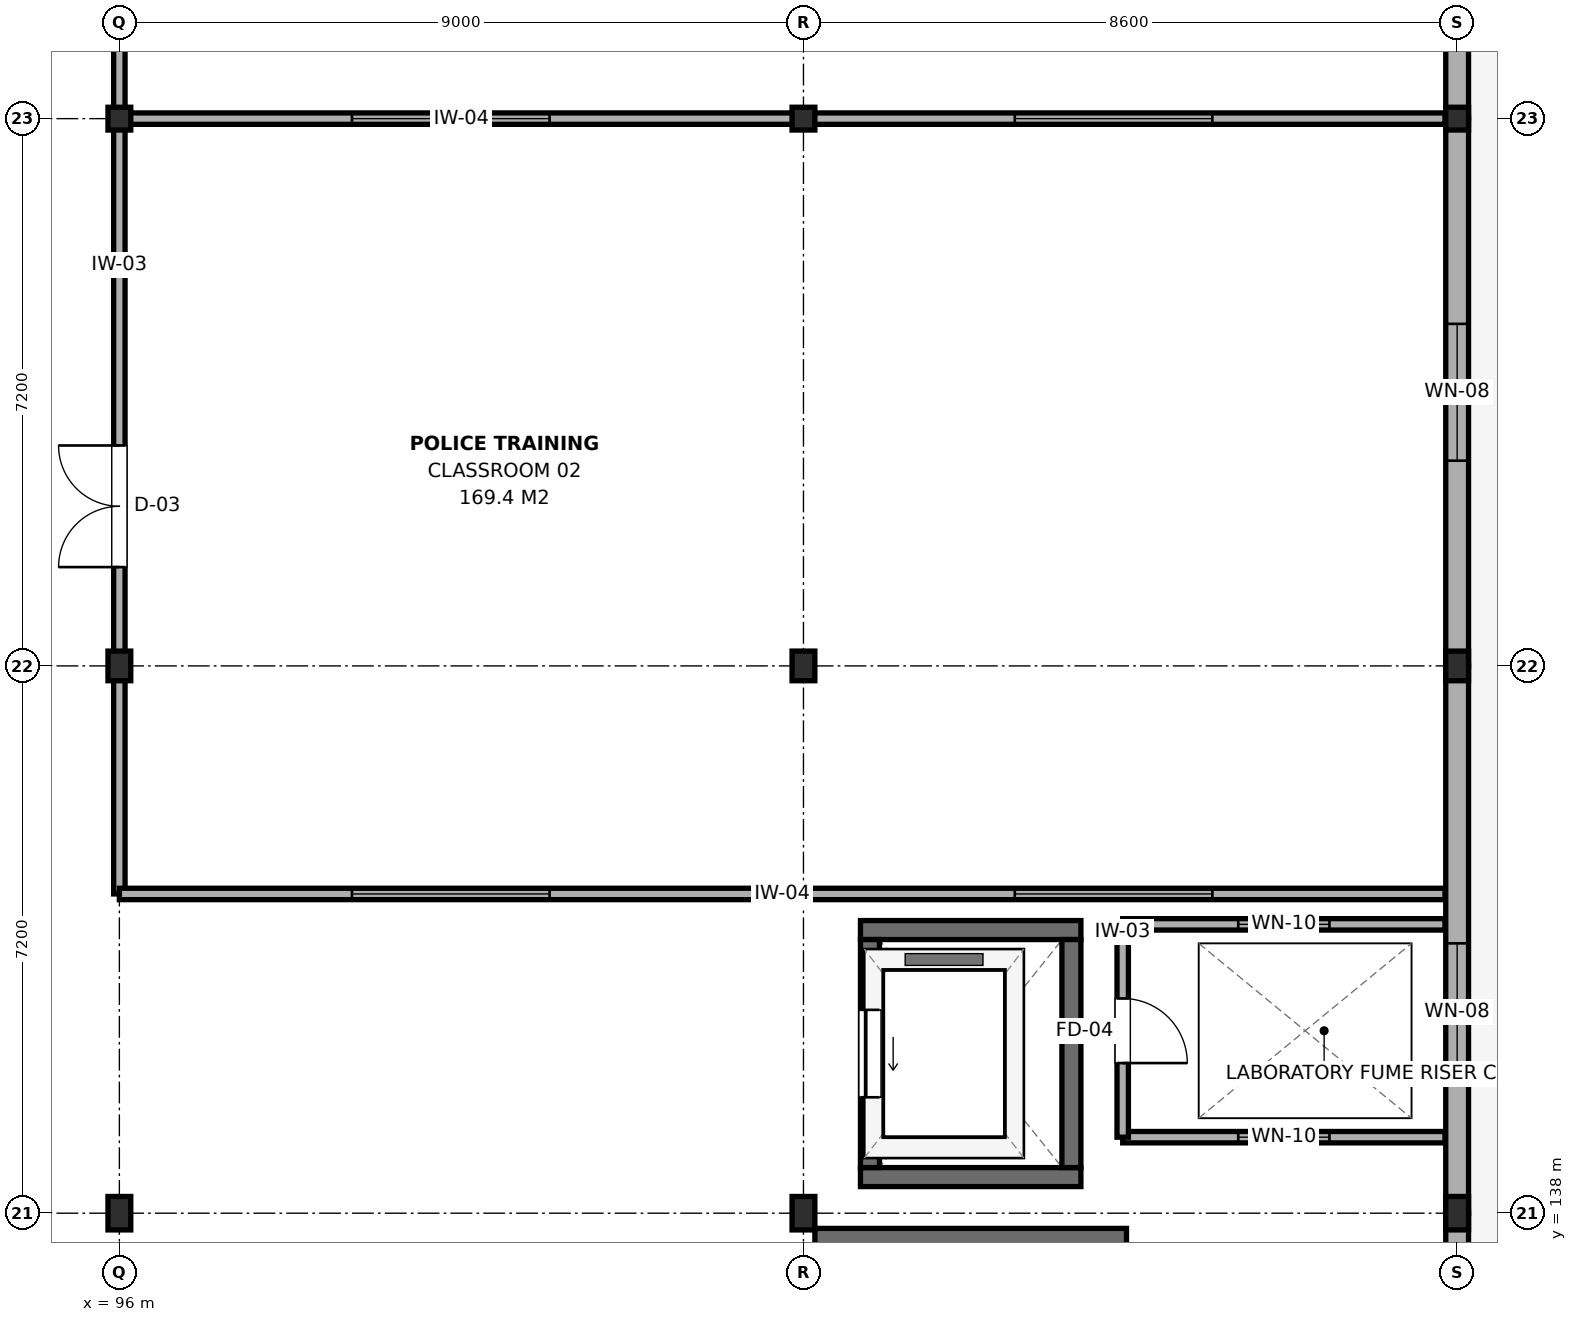
"""IFC4 building model, lengths in metres.
Left out: names, types, materials, properties, quantities, classifications, styles, units other than length and angle.
Written with IfcOpenShell. Run it as: python <this file> out.ifc"""

import sys

from ifc_helpers import new_model, si_unit, direction, frame, frame_2d, origin, origin_2d, place, context, subcontext, project, spatial, rectangle, i_section, extrude, element, fill, save


model = new_model("IFC4")
c1 = context("Model", 3, precision=1e-05, world=origin(), true_north=direction((0.0, 1.0)))
c2 = subcontext(c1, "Body", "Model", "MODEL_VIEW")
j1 = project(units=[si_unit("LENGTHUNIT", "METRE"), si_unit("PLANEANGLEUNIT", "RADIAN")], contexts=[c1])
p1 = place(None, origin())
s1 = spatial("IfcSite", under=j1, at=p1, CompositionType="ELEMENT")
p2 = place(p1, origin())
s2 = spatial("IfcBuilding", under=s1, at=p2, CompositionType="ELEMENT")
p3 = place(p2, frame((0.0, 0.0, 13.2)))
s3 = spatial("IfcBuildingStorey", under=s2, at=p3, CompositionType="ELEMENT", Elevation=13.2)
p4 = place(p3, frame((96.0, 138.0, 0.0), z_axis=(0.0, 0.0, 1.0), x_axis=(1.0, 0.0, 0.0)))
e1 = element("IfcColumn", 1, at=p4, inside=s3, PredefinedType="COLUMN", context=c2, shape_type="SweptSolid", body=[
    extrude(i_section(OverallWidth=0.3, OverallDepth=0.44, WebThickness=0.011, FlangeThickness=0.021, FilletRadius=0.027, at=origin_2d()), origin(), (0.0, 0.0, 1.0), 3.9),
])
p5 = place(p3, frame((96.0, 145.2, 0.0), z_axis=(0.0, 0.0, 1.0), x_axis=(1.0, 0.0, 0.0)))
e2 = element("IfcColumn", 2, at=p5, inside=s3, PredefinedType="COLUMN", context=c2, shape_type="SweptSolid", body=[
    extrude(i_section(OverallWidth=0.3, OverallDepth=0.39, WebThickness=0.011, FlangeThickness=0.019, FilletRadius=0.027, at=origin_2d()), origin(), (0.0, 0.0, 1.0), 3.9),
])
p6 = place(p3, frame((96.0, 152.4, 0.0), z_axis=(0.0, 0.0, 1.0), x_axis=(1.0, 0.0, 0.0)))
e3 = element("IfcColumn", 3, at=p6, inside=s3, PredefinedType="COLUMN", context=c2, shape_type="SweptSolid", body=[
    extrude(i_section(OverallWidth=0.3, OverallDepth=0.3, WebThickness=0.011, FlangeThickness=0.019, FilletRadius=0.027, at=origin_2d()), origin(), (0.0, 0.0, 1.0), 3.9),
])
p7 = place(p3, frame((105.0, 138.0, 0.0), z_axis=(0.0, 0.0, 1.0), x_axis=(1.0, 0.0, 0.0)))
e4 = element("IfcColumn", 4, at=p7, inside=s3, PredefinedType="COLUMN", context=c2, shape_type="SweptSolid", body=[
    extrude(i_section(OverallWidth=0.3, OverallDepth=0.44, WebThickness=0.011, FlangeThickness=0.021, FilletRadius=0.027, at=origin_2d()), origin(), (0.0, 0.0, 1.0), 3.9),
])
p8 = place(p3, frame((105.0, 145.2, 0.0), z_axis=(0.0, 0.0, 1.0), x_axis=(1.0, 0.0, 0.0)))
e5 = element("IfcColumn", 5, at=p8, inside=s3, PredefinedType="COLUMN", context=c2, shape_type="SweptSolid", body=[
    extrude(i_section(OverallWidth=0.3, OverallDepth=0.39, WebThickness=0.011, FlangeThickness=0.019, FilletRadius=0.027, at=origin_2d()), origin(), (0.0, 0.0, 1.0), 3.9),
])
p9 = place(p3, frame((105.0, 152.4, 0.0), z_axis=(0.0, 0.0, 1.0), x_axis=(1.0, 0.0, 0.0)))
e6 = element("IfcColumn", 6, at=p9, inside=s3, PredefinedType="COLUMN", context=c2, shape_type="SweptSolid", body=[
    extrude(i_section(OverallWidth=0.3, OverallDepth=0.3, WebThickness=0.011, FlangeThickness=0.019, FilletRadius=0.027, at=origin_2d()), origin(), (0.0, 0.0, 1.0), 3.9),
])
p10 = place(p3, frame((113.6, 138.0, 0.0), z_axis=(0.0, 0.0, 1.0), x_axis=(1.0, 0.0, 0.0)))
e7 = element("IfcColumn", 7, at=p10, inside=s3, PredefinedType="COLUMN", context=c2, shape_type="SweptSolid", body=[
    extrude(i_section(OverallWidth=0.3, OverallDepth=0.44, WebThickness=0.011, FlangeThickness=0.021, FilletRadius=0.027, at=origin_2d()), origin(), (0.0, 0.0, 1.0), 3.9),
])
p11 = place(p3, frame((113.6, 145.2, 0.0), z_axis=(0.0, 0.0, 1.0), x_axis=(1.0, 0.0, 0.0)))
e8 = element("IfcColumn", 8, at=p11, inside=s3, PredefinedType="COLUMN", context=c2, shape_type="SweptSolid", body=[
    extrude(i_section(OverallWidth=0.3, OverallDepth=0.39, WebThickness=0.011, FlangeThickness=0.019, FilletRadius=0.027, at=origin_2d()), origin(), (0.0, 0.0, 1.0), 3.9),
])
p12 = place(p3, frame((113.6, 152.4, 0.0), z_axis=(0.0, 0.0, 1.0), x_axis=(1.0, 0.0, 0.0)))
e9 = element("IfcColumn", 9, at=p12, inside=s3, PredefinedType="COLUMN", context=c2, shape_type="SweptSolid", body=[
    extrude(i_section(OverallWidth=0.3, OverallDepth=0.3, WebThickness=0.011, FlangeThickness=0.019, FilletRadius=0.027, at=origin_2d()), origin(), (0.0, 0.0, 1.0), 3.9),
])
p13 = place(p3, frame((105.15, 137.675, 0.0), z_axis=(0.0, 0.0, 1.0), x_axis=(1.0, 0.0, 0.0)))
e10 = element("IfcWall", 10, at=p13, inside=s3, PredefinedType="SHEAR", context=c2, shape_type="SweptSolid", body=[
    extrude(rectangle(XDim=4.1, YDim=0.25, at=frame_2d((2.05, 0.0))), origin(), (0.0, 0.0, 1.0), 3.7),
])
for number, where, z_axis, x_axis in (
    (11, (105.75, 138.475, 0.0), (0.0, 0.0, 1.0), (1.0, 0.0, 0.0)),
    (12, (105.75, 141.725, 0.0), (0.0, 0.0, 1.0), (1.0, 0.0, 0.0)),
):
    element("IfcWall", number, at=place(p3, frame(where, z_axis=z_axis, x_axis=x_axis)), inside=s3, PredefinedType="SHEAR", context=c2, shape_type="SweptSolid", body=[
        extrude(rectangle(XDim=2.9, YDim=0.25, at=frame_2d((1.45, 0.0))), origin(), (0.0, 0.0, 1.0), 3.7),
    ])
p14 = place(p3, frame((105.875, 138.6, 0.0), z_axis=(0.0, 0.0, 1.0), x_axis=(0.0, 1.0, 0.0)))
e13 = element("IfcWall", 13, at=p14, inside=s3, PredefinedType="SHEAR", context=c2, shape_type="SweptSolid", body=[
    extrude(rectangle(XDim=3.0, YDim=0.25, at=frame_2d((1.5, 0.0))), origin(), (0.0, 0.0, 1.0), 3.7),
])
p15 = place(p14, frame((0.925, 0.0, 0.0)))
e14 = element("IfcOpeningElement", 14, at=p15, cuts=e13, PredefinedType="OPENING", context=c2, shape_type="SweptSolid", body=[
    extrude(rectangle(XDim=1.15, YDim=2.15, at=frame_2d((0.575, 1.075))), frame((0.0, 0.14, 0.0), z_axis=(0.0, -1.0, 0.0), x_axis=(1.0, 0.0, 0.0)), (0.0, 0.0, 1.0), 0.28),
])
p16 = place(p3, frame((108.525, 138.6, 0.0), z_axis=(0.0, 0.0, 1.0), x_axis=(0.0, 1.0, 0.0)))
e15 = element("IfcWall", 15, at=p16, inside=s3, PredefinedType="SHEAR", context=c2, shape_type="SweptSolid", body=[
    extrude(rectangle(XDim=3.0, YDim=0.25, at=frame_2d((1.5, 0.0))), origin(), (0.0, 0.0, 1.0), 3.7),
])
p17 = place(p3, frame((113.6, 130.8, 0.0), z_axis=(0.0, 0.0, 1.0), x_axis=(0.0, 1.0, 0.0)))
e16 = element("IfcWall", 16, at=p17, inside=s3, PredefinedType="SOLIDWALL", context=c2, shape_type="SweptSolid", body=[
    extrude(rectangle(XDim=7.2, YDim=0.3, at=frame_2d((3.6, 0.0))), origin(), (0.0, 0.0, 1.0), 3.095),
])
p18 = place(p17, frame((2.7, 0.0, 0.65)))
e17 = element("IfcOpeningElement", 17, at=p18, cuts=e16, PredefinedType="OPENING", context=c2, shape_type="SweptSolid", body=[
    extrude(rectangle(XDim=1.8, YDim=1.2, at=frame_2d((0.9, 0.6))), frame((0.0, 0.165, 0.0), z_axis=(0.0, -1.0, 0.0), x_axis=(1.0, 0.0, 0.0)), (0.0, 0.0, 1.0), 0.33),
])
p19 = place(p3, frame((113.6, 138.0, 0.0), z_axis=(0.0, 0.0, 1.0), x_axis=(0.0, 1.0, 0.0)))
e18 = element("IfcWall", 18, at=p19, inside=s3, PredefinedType="SOLIDWALL", context=c2, shape_type="SweptSolid", body=[
    extrude(rectangle(XDim=7.2, YDim=0.3, at=frame_2d((3.6, 0.0))), origin(), (0.0, 0.0, 1.0), 3.095),
])
p20 = place(p19, frame((1.75, 0.0, 0.65)))
e19 = element("IfcOpeningElement", 19, at=p20, cuts=e18, PredefinedType="OPENING", context=c2, shape_type="SweptSolid", body=[
    extrude(rectangle(XDim=1.8, YDim=1.2, at=frame_2d((0.9, 0.6))), frame((0.0, 0.165, 0.0), z_axis=(0.0, -1.0, 0.0), x_axis=(1.0, 0.0, 0.0)), (0.0, 0.0, 1.0), 0.33),
])
p21 = place(p3, frame((113.6, 145.2, 0.0), z_axis=(0.0, 0.0, 1.0), x_axis=(0.0, 1.0, 0.0)))
e20 = element("IfcWall", 20, at=p21, inside=s3, PredefinedType="SOLIDWALL", context=c2, shape_type="SweptSolid", body=[
    extrude(rectangle(XDim=7.2, YDim=0.3, at=frame_2d((3.6, 0.0))), origin(), (0.0, 0.0, 1.0), 3.145),
])
p22 = place(p21, frame((2.7, 0.0, 0.65)))
e21 = element("IfcOpeningElement", 21, at=p22, cuts=e20, PredefinedType="OPENING", context=c2, shape_type="SweptSolid", body=[
    extrude(rectangle(XDim=1.8, YDim=1.2, at=frame_2d((0.9, 0.6))), frame((0.0, 0.165, 0.0), z_axis=(0.0, -1.0, 0.0), x_axis=(1.0, 0.0, 0.0)), (0.0, 0.0, 1.0), 0.33),
])
p23 = place(p3, frame((113.6, 152.4, 0.0), z_axis=(0.0, 0.0, 1.0), x_axis=(0.0, 1.0, 0.0)))
e22 = element("IfcWall", 22, at=p23, inside=s3, PredefinedType="SOLIDWALL", context=c2, shape_type="SweptSolid", body=[
    extrude(rectangle(XDim=7.2, YDim=0.3, at=frame_2d((3.6, 0.0))), origin(), (0.0, 0.0, 1.0), 3.195),
])
p24 = place(p23, frame((2.7, 0.0, 0.65)))
e23 = element("IfcOpeningElement", 23, at=p24, cuts=e22, PredefinedType="OPENING", context=c2, shape_type="SweptSolid", body=[
    extrude(rectangle(XDim=1.8, YDim=1.2, at=frame_2d((0.9, 0.6))), frame((0.0, 0.165, 0.0), z_axis=(0.0, -1.0, 0.0), x_axis=(1.0, 0.0, 0.0)), (0.0, 0.0, 1.0), 0.33),
])
p25 = place(p3, frame((109.2, 139.0, 0.0), z_axis=(0.0, 0.0, 1.0), x_axis=(1.0, 0.0, 0.0)))
e24 = element("IfcWall", 24, at=p25, inside=s3, PredefinedType="PARTITIONING", context=c2, shape_type="SweptSolid", body=[
    extrude(rectangle(XDim=4.24, YDim=0.15, at=frame_2d((2.12, 0.0))), origin(), (0.0, 0.0, 1.0), 3.145),
])
p26 = place(p25, frame((1.52, 0.0, 0.95)))
e25 = element("IfcOpeningElement", 25, at=p26, cuts=e24, PredefinedType="OPENING", context=c2, shape_type="SweptSolid", body=[
    extrude(rectangle(XDim=1.2, YDim=1.5, at=frame_2d((0.6, 0.75))), frame((0.0, 0.09, 0.0), z_axis=(0.0, -1.0, 0.0), x_axis=(1.0, 0.0, 0.0)), (0.0, 0.0, 1.0), 0.18),
])
p27 = place(p3, frame((109.2, 141.8, 0.0), z_axis=(0.0, 0.0, 1.0), x_axis=(1.0, 0.0, 0.0)))
e26 = element("IfcWall", 26, at=p27, inside=s3, PredefinedType="PARTITIONING", context=c2, shape_type="SweptSolid", body=[
    extrude(rectangle(XDim=4.24, YDim=0.15, at=frame_2d((2.12, 0.0))), origin(), (0.0, 0.0, 1.0), 3.145),
])
p28 = place(p27, frame((1.52, 0.0, 0.95)))
e27 = element("IfcOpeningElement", 27, at=p28, cuts=e26, PredefinedType="OPENING", context=c2, shape_type="SweptSolid", body=[
    extrude(rectangle(XDim=1.2, YDim=1.5, at=frame_2d((0.6, 0.75))), frame((0.0, 0.09, 0.0), z_axis=(0.0, -1.0, 0.0), x_axis=(1.0, 0.0, 0.0)), (0.0, 0.0, 1.0), 0.18),
])
p29 = place(p3, frame((109.2, 139.0, 0.0), z_axis=(0.0, 0.0, 1.0), x_axis=(0.0, 1.0, 0.0)))
e28 = element("IfcWall", 28, at=p29, inside=s3, PredefinedType="PARTITIONING", context=c2, shape_type="SweptSolid", body=[
    extrude(rectangle(XDim=2.8, YDim=0.15, at=frame_2d((1.4, 0.0))), origin(), (0.0, 0.0, 1.0), 3.695),
])
p30 = place(p29, frame((0.975, 0.0, 0.0)))
e29 = element("IfcOpeningElement", 29, at=p30, cuts=e28, PredefinedType="OPENING", context=c2, shape_type="SweptSolid", body=[
    extrude(rectangle(XDim=0.85, YDim=2.1, at=frame_2d((0.425, 1.05))), frame((0.0, 0.09, 0.0), z_axis=(0.0, -1.0, 0.0), x_axis=(1.0, 0.0, 0.0)), (0.0, 0.0, 1.0), 0.18),
])
p31 = place(p3, frame((96.0, 142.2, 0.0), z_axis=(0.0, 0.0, 1.0), x_axis=(0.0, 1.0, 0.0)))
e30 = element("IfcWall", 30, at=p31, inside=s3, PredefinedType="PARTITIONING", context=c2, shape_type="SweptSolid", body=[
    extrude(rectangle(XDim=10.2, YDim=0.15, at=frame_2d((5.1, 0.0))), origin(), (0.0, 0.0, 1.0), 3.105),
])
p32 = place(p31, frame((4.3, 0.0, 0.0)))
e31 = element("IfcOpeningElement", 31, at=p32, cuts=e30, PredefinedType="OPENING", context=c2, shape_type="SweptSolid", body=[
    extrude(rectangle(XDim=1.6, YDim=2.15, at=frame_2d((0.8, 1.075))), frame((0.0, 0.09, 0.0), z_axis=(0.0, -1.0, 0.0), x_axis=(1.0, 0.0, 0.0)), (0.0, 0.0, 1.0), 0.18),
])
p33 = place(p3, frame((96.0, 142.2, 0.0), z_axis=(0.0, 0.0, 1.0), x_axis=(1.0, 0.0, 0.0)))
e32 = element("IfcWall", 32, at=p33, inside=s3, PredefinedType="PARTITIONING", context=c2, shape_type="SweptSolid", body=[
    extrude(rectangle(XDim=17.44, YDim=0.15, at=frame_2d((8.72, 0.0))), origin(), (0.0, 0.0, 1.0), 3.145),
])
p34 = place(p33, frame((3.06, 0.0, 0.95)))
e33 = element("IfcOpeningElement", 33, at=p34, cuts=e32, PredefinedType="OPENING", context=c2, shape_type="SweptSolid", body=[
    extrude(rectangle(XDim=2.6, YDim=1.5, at=frame_2d((1.3, 0.75))), frame((0.0, 0.09, 0.0), z_axis=(0.0, -1.0, 0.0), x_axis=(1.0, 0.0, 0.0)), (0.0, 0.0, 1.0), 0.18),
])
p35 = place(p33, frame((11.78, 0.0, 0.95)))
e34 = element("IfcOpeningElement", 34, at=p35, cuts=e32, PredefinedType="OPENING", context=c2, shape_type="SweptSolid", body=[
    extrude(rectangle(XDim=2.6, YDim=1.5, at=frame_2d((1.3, 0.75))), frame((0.0, 0.09, 0.0), z_axis=(0.0, -1.0, 0.0), x_axis=(1.0, 0.0, 0.0)), (0.0, 0.0, 1.0), 0.18),
])
p36 = place(p3, frame((96.0, 152.4, 0.0), z_axis=(0.0, 0.0, 1.0), x_axis=(0.0, 1.0, 0.0)))
e35 = element("IfcWall", 35, at=p36, inside=s3, PredefinedType="PARTITIONING", context=c2, shape_type="SweptSolid", body=[
    extrude(rectangle(XDim=7.2, YDim=0.15, at=frame_2d((3.6, 0.0))), origin(), (0.0, 0.0, 1.0), 3.195),
])
p37 = place(p36, frame((2.8, 0.0, 0.0)))
e36 = element("IfcOpeningElement", 36, at=p37, cuts=e35, PredefinedType="OPENING", context=c2, shape_type="SweptSolid", body=[
    extrude(rectangle(XDim=1.6, YDim=2.15, at=frame_2d((0.8, 1.075))), frame((0.0, 0.09, 0.0), z_axis=(0.0, -1.0, 0.0), x_axis=(1.0, 0.0, 0.0)), (0.0, 0.0, 1.0), 0.18),
])
p38 = place(p3, frame((96.0, 152.4, 0.0), z_axis=(0.0, 0.0, 1.0), x_axis=(1.0, 0.0, 0.0)))
e37 = element("IfcWall", 37, at=p38, inside=s3, PredefinedType="PARTITIONING", context=c2, shape_type="SweptSolid", body=[
    extrude(rectangle(XDim=17.44, YDim=0.15, at=frame_2d((8.72, 0.0))), origin(), (0.0, 0.0, 1.0), 3.105),
])
p39 = place(p38, frame((3.06, 0.0, 0.95)))
e38 = element("IfcOpeningElement", 38, at=p39, cuts=e37, PredefinedType="OPENING", context=c2, shape_type="SweptSolid", body=[
    extrude(rectangle(XDim=2.6, YDim=1.5, at=frame_2d((1.3, 0.75))), frame((0.0, 0.09, 0.0), z_axis=(0.0, -1.0, 0.0), x_axis=(1.0, 0.0, 0.0)), (0.0, 0.0, 1.0), 0.18),
])
p40 = place(p38, frame((11.78, 0.0, 0.95)))
e39 = element("IfcOpeningElement", 39, at=p40, cuts=e37, PredefinedType="OPENING", context=c2, shape_type="SweptSolid", body=[
    extrude(rectangle(XDim=2.6, YDim=1.5, at=frame_2d((1.3, 0.75))), frame((0.0, 0.09, 0.0), z_axis=(0.0, -1.0, 0.0), x_axis=(1.0, 0.0, 0.0)), (0.0, 0.0, 1.0), 0.18),
])
p41 = place(p20, origin())
e40 = element("IfcWindow", 40, at=p41, inside=s3, PartitioningType="SINGLE_PANEL", PredefinedType="WINDOW", context=c2, shape_type="SweptSolid", body=[
    extrude(rectangle(XDim=1.8, YDim=1.2, at=frame_2d((0.9, 0.6))), frame((0.0, 0.03, 0.0), z_axis=(0.0, -1.0, 0.0), x_axis=(1.0, 0.0, 0.0)), (0.0, 0.0, 1.0), 0.06),
])
fill(e19, e40)
p42 = place(p22, origin())
e41 = element("IfcWindow", 41, at=p42, inside=s3, PartitioningType="SINGLE_PANEL", PredefinedType="WINDOW", context=c2, shape_type="SweptSolid", body=[
    extrude(rectangle(XDim=1.8, YDim=1.2, at=frame_2d((0.9, 0.6))), frame((0.0, 0.03, 0.0), z_axis=(0.0, -1.0, 0.0), x_axis=(1.0, 0.0, 0.0)), (0.0, 0.0, 1.0), 0.06),
])
fill(e21, e41)
p43 = place(p15, origin())
e42 = element("IfcDoor", 42, at=p43, inside=s3, OperationType="SLIDING_TO_LEFT", PredefinedType="DOOR", context=c2, shape_type="SweptSolid", body=[
    extrude(rectangle(XDim=1.15, YDim=2.15, at=frame_2d((0.575, 1.075))), frame((0.0, 0.025, 0.0), z_axis=(0.0, -1.0, 0.0), x_axis=(1.0, 0.0, 0.0)), (0.0, 0.0, 1.0), 0.05),
])
fill(e14, e42)
p44 = place(p26, origin())
e43 = element("IfcWindow", 43, at=p44, inside=s3, PartitioningType="SINGLE_PANEL", PredefinedType="WINDOW", context=c2, shape_type="SweptSolid", body=[
    extrude(rectangle(XDim=1.2, YDim=1.5, at=frame_2d((0.6, 0.75))), frame((0.0, 0.03, 0.0), z_axis=(0.0, -1.0, 0.0), x_axis=(1.0, 0.0, 0.0)), (0.0, 0.0, 1.0), 0.06),
])
fill(e25, e43)
p45 = place(p28, origin())
e44 = element("IfcWindow", 44, at=p45, inside=s3, PartitioningType="SINGLE_PANEL", PredefinedType="WINDOW", context=c2, shape_type="SweptSolid", body=[
    extrude(rectangle(XDim=1.2, YDim=1.5, at=frame_2d((0.6, 0.75))), frame((0.0, 0.03, 0.0), z_axis=(0.0, -1.0, 0.0), x_axis=(1.0, 0.0, 0.0)), (0.0, 0.0, 1.0), 0.06),
])
fill(e27, e44)
p46 = place(p30, frame((0.85, 0.0, 0.0), z_axis=(0.0, 0.0, 1.0), x_axis=(-1.0, 0.0, 0.0)))
e45 = element("IfcDoor", 45, at=p46, inside=s3, OperationType="SINGLE_SWING_RIGHT", PredefinedType="DOOR", context=c2, shape_type="SweptSolid", body=[
    extrude(rectangle(XDim=0.85, YDim=2.1, at=frame_2d((0.425, 1.05))), frame((0.0, 0.025, 0.0), z_axis=(0.0, -1.0, 0.0), x_axis=(1.0, 0.0, 0.0)), (0.0, 0.0, 1.0), 0.05),
])
fill(e29, e45)
p47 = place(p32, origin())
e46 = element("IfcDoor", 46, at=p47, inside=s3, OperationType="DOUBLE_DOOR_SINGLE_SWING", PredefinedType="DOOR", context=c2, shape_type="SweptSolid", body=[
    extrude(rectangle(XDim=1.6, YDim=2.15, at=frame_2d((0.8, 1.075))), frame((0.0, 0.025, 0.0), z_axis=(0.0, -1.0, 0.0), x_axis=(1.0, 0.0, 0.0)), (0.0, 0.0, 1.0), 0.05),
])
fill(e31, e46)
p48 = place(p34, origin())
e47 = element("IfcWindow", 47, at=p48, inside=s3, PartitioningType="SINGLE_PANEL", PredefinedType="WINDOW", context=c2, shape_type="SweptSolid", body=[
    extrude(rectangle(XDim=2.6, YDim=1.5, at=frame_2d((1.3, 0.75))), frame((0.0, 0.03, 0.0), z_axis=(0.0, -1.0, 0.0), x_axis=(1.0, 0.0, 0.0)), (0.0, 0.0, 1.0), 0.06),
])
fill(e33, e47)
p49 = place(p35, origin())
e48 = element("IfcWindow", 48, at=p49, inside=s3, PartitioningType="SINGLE_PANEL", PredefinedType="WINDOW", context=c2, shape_type="SweptSolid", body=[
    extrude(rectangle(XDim=2.6, YDim=1.5, at=frame_2d((1.3, 0.75))), frame((0.0, 0.03, 0.0), z_axis=(0.0, -1.0, 0.0), x_axis=(1.0, 0.0, 0.0)), (0.0, 0.0, 1.0), 0.06),
])
fill(e34, e48)
p50 = place(p39, origin())
e49 = element("IfcWindow", 49, at=p50, inside=s3, PartitioningType="SINGLE_PANEL", PredefinedType="WINDOW", context=c2, shape_type="SweptSolid", body=[
    extrude(rectangle(XDim=2.6, YDim=1.5, at=frame_2d((1.3, 0.75))), frame((0.0, 0.03, 0.0), z_axis=(0.0, -1.0, 0.0), x_axis=(1.0, 0.0, 0.0)), (0.0, 0.0, 1.0), 0.06),
])
fill(e38, e49)
p51 = place(p40, origin())
e50 = element("IfcWindow", 50, at=p51, inside=s3, PartitioningType="SINGLE_PANEL", PredefinedType="WINDOW", context=c2, shape_type="SweptSolid", body=[
    extrude(rectangle(XDim=2.6, YDim=1.5, at=frame_2d((1.3, 0.75))), frame((0.0, 0.03, 0.0), z_axis=(0.0, -1.0, 0.0), x_axis=(1.0, 0.0, 0.0)), (0.0, 0.0, 1.0), 0.06),
])
fill(e39, e50)
save(model, sys.argv[1])
